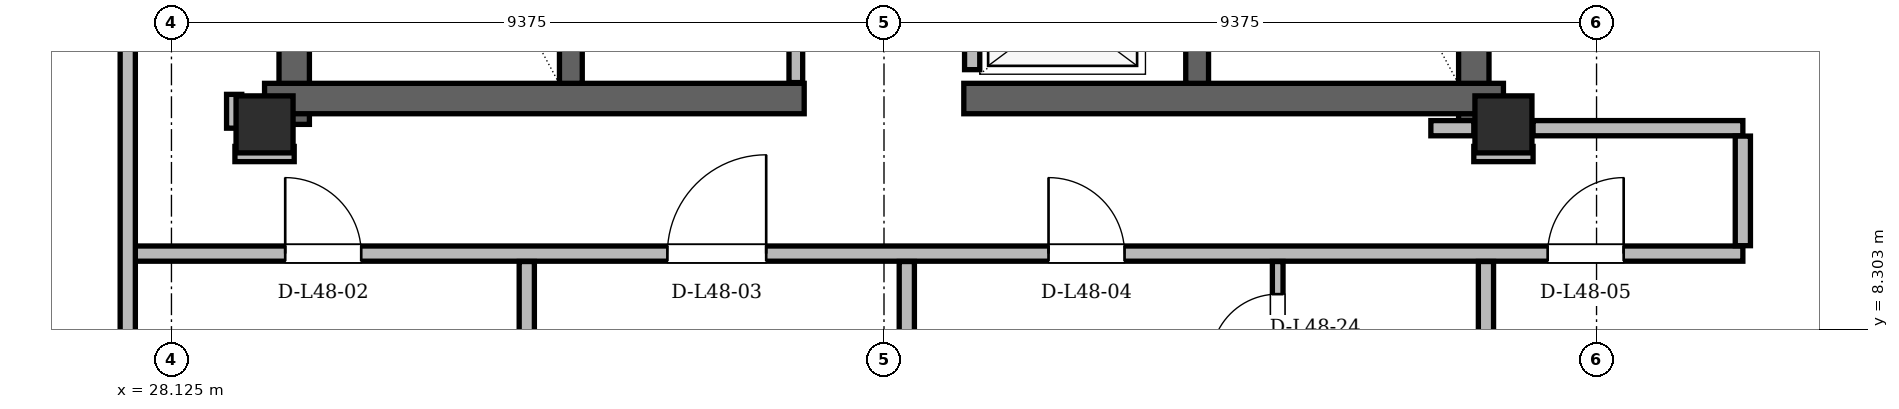
"""IFC4 building model, lengths in metres.
Left out: names, types, materials, properties, quantities, classifications, styles, units other than length and angle.
Written with IfcOpenShell. Run it as: python <this file> out.ifc"""

import sys

from ifc_helpers import new_model, si_unit, direction, frame, frame_2d, origin, origin_2d, place, context, subcontext, project, spatial, rectangle, hollow_rectangle, extrude, element, fill, save


model = new_model("IFC4")
c1 = context("Model", 3, precision=1e-05, world=origin(), true_north=direction((0.0, 1.0)))
c2 = subcontext(c1, "Body", "Model", "MODEL_VIEW")
j1 = project(units=[si_unit("LENGTHUNIT", "METRE"), si_unit("PLANEANGLEUNIT", "RADIAN")], contexts=[c1])
p1 = place(None, origin())
s1 = spatial("IfcSite", under=j1, at=p1, CompositionType="ELEMENT")
p2 = place(p1, origin())
s2 = spatial("IfcBuilding", under=s1, at=p2, CompositionType="ELEMENT")
p3 = place(p2, frame((0.0, 0.0, 181.8)))
s3 = spatial("IfcBuildingStorey", under=s2, at=p3, CompositionType="ELEMENT", Elevation=181.8)
for number, where, z_axis, x_axis in (
    (1, (29.35, 11.0, 0.0), (0.0, 0.0, 1.0), (1.0, 0.0, 0.0)),
    (2, (45.65, 11.0, 0.0), (0.0, 0.0, 1.0), (1.0, 0.0, 0.0)),
):
    element("IfcColumn", number, at=place(p3, frame(where, z_axis=z_axis, x_axis=x_axis)), inside=s3, PredefinedType="COLUMN", context=c2, shape_type="SweptSolid", body=[
        extrude(hollow_rectangle(XDim=0.75, YDim=0.75, WallThickness=0.06, at=origin_2d()), origin(), (0.0, 0.0, 1.0), 3.6),
    ])
for number, where, z_axis, x_axis in (
    (3, (29.74, 11.0, 0.0), (0.0, 0.0, 1.0), (0.0, 1.0, 0.0)),
    (4, (45.26, 11.0, 0.0), (0.0, 0.0, 1.0), (0.0, 1.0, 0.0)),
):
    element("IfcWall", number, at=place(p3, frame(where, z_axis=z_axis, x_axis=x_axis)), inside=s3, PredefinedType="SHEAR", context=c2, shape_type="SweptSolid", body=[
        extrude(rectangle(XDim=13.3, YDim=0.4, at=frame_2d((6.65, 0.0))), origin(), (0.0, 0.0, 1.0), 3.38),
    ])
for number, where, z_axis, x_axis in (
    (5, (29.35, 11.34, 0.0), (0.0, 0.0, 1.0), (1.0, 0.0, 0.0)),
    (6, (38.55, 11.34, 0.0), (0.0, 0.0, 1.0), (1.0, 0.0, 0.0)),
):
    element("IfcWall", number, at=place(p3, frame(where, z_axis=z_axis, x_axis=x_axis)), inside=s3, PredefinedType="SHEAR", context=c2, shape_type="SweptSolid", body=[
        extrude(rectangle(XDim=7.1, YDim=0.4, at=frame_2d((3.55, 0.0))), origin(), (0.0, 0.0, 1.0), 3.38),
    ])
for number, where, z_axis, x_axis in (
    (7, (33.38, 11.54, 0.0), (0.0, 0.0, 1.0), (0.0, 1.0, 0.0)),
    (8, (41.62, 11.54, 0.0), (0.0, 0.0, 1.0), (0.0, 1.0, 0.0)),
):
    element("IfcWall", number, at=place(p3, frame(where, z_axis=z_axis, x_axis=x_axis)), inside=s3, PredefinedType="SHEAR", context=c2, shape_type="SweptSolid", body=[
        extrude(rectangle(XDim=7.62, YDim=0.3, at=frame_2d((3.81, 0.0))), origin(), (0.0, 0.0, 1.0), 3.38),
    ])
p4 = place(p3, frame((36.34, 11.55, 0.0), z_axis=(0.0, 0.0, 1.0), x_axis=(0.0, 1.0, 0.0)))
e9 = element("IfcWall", 9, at=p4, inside=s3, PredefinedType="PARTITIONING", context=c2, shape_type="SweptSolid", body=[
    extrude(rectangle(XDim=5.55, YDim=0.18, at=frame_2d((2.775, 0.0))), origin(), (0.0, 0.0, 1.0), 3.38),
])
p5 = place(p4, frame((2.85, 0.0, 0.0)))
e10 = element("IfcOpeningElement", 10, at=p5, cuts=e9, PredefinedType="OPENING", context=c2, shape_type="SweptSolid", body=[
    extrude(rectangle(XDim=0.95, YDim=2.1, at=frame_2d((0.475, 1.05))), frame((0.0, 0.09, 0.0), z_axis=(0.0, -1.0, 0.0), x_axis=(1.0, 0.0, 0.0)), (0.0, 0.0, 1.0), 0.18),
])
p6 = place(p3, frame((38.66, 11.72, 0.0), z_axis=(0.0, 0.0, 1.0), x_axis=(0.0, 1.0, 0.0)))
e11 = element("IfcWall", 11, at=p6, inside=s3, PredefinedType="PARTITIONING", context=c2, shape_type="SweptSolid", body=[
    extrude(rectangle(XDim=9.1, YDim=0.2, at=frame_2d((4.55, 0.0))), origin(), (0.0, 0.0, 1.0), 3.38),
])
p7 = place(p6, frame((0.255, 0.0, 0.0)))
e12 = element("IfcOpeningElement", 12, at=p7, cuts=e11, PredefinedType="OPENING", context=c2, shape_type="SweptSolid", body=[
    extrude(rectangle(XDim=1.05, YDim=2.15, at=frame_2d((0.525, 1.075))), frame((0.0, 0.1, 0.0), z_axis=(0.0, -1.0, 0.0), x_axis=(1.0, 0.0, 0.0)), (0.0, 0.0, 1.0), 0.2),
])
p8 = place(p6, frame((2.105, 0.0, 0.0)))
e13 = element("IfcOpeningElement", 13, at=p8, cuts=e11, PredefinedType="OPENING", context=c2, shape_type="SweptSolid", body=[
    extrude(rectangle(XDim=1.05, YDim=2.15, at=frame_2d((0.525, 1.075))), frame((0.0, 0.1, 0.0), z_axis=(0.0, -1.0, 0.0), x_axis=(1.0, 0.0, 0.0)), (0.0, 0.0, 1.0), 0.2),
])
p9 = place(p6, frame((3.955, 0.0, 0.0)))
e14 = element("IfcOpeningElement", 14, at=p9, cuts=e11, PredefinedType="OPENING", context=c2, shape_type="SweptSolid", body=[
    extrude(rectangle(XDim=1.05, YDim=2.15, at=frame_2d((0.525, 1.075))), frame((0.0, 0.1, 0.0), z_axis=(0.0, -1.0, 0.0), x_axis=(1.0, 0.0, 0.0)), (0.0, 0.0, 1.0), 0.2),
])
p10 = place(p3, frame((27.55, 9.3, 0.0), z_axis=(0.0, 0.0, 1.0), x_axis=(1.0, 0.0, 0.0)))
e15 = element("IfcWall", 15, at=p10, inside=s3, PredefinedType="PARTITIONING", context=c2, shape_type="SweptSolid", body=[
    extrude(rectangle(XDim=21.25, YDim=0.2, at=frame_2d((10.625, 0.0))), origin(), (0.0, 0.0, 1.0), 2.842),
])
p11 = place(p10, frame((2.072, 0.0, 0.0)))
e16 = element("IfcOpeningElement", 16, at=p11, cuts=e15, PredefinedType="OPENING", context=c2, shape_type="SweptSolid", body=[
    extrude(rectangle(XDim=1.0, YDim=2.18, at=frame_2d((0.5, 1.09))), frame((0.0, 0.1, 0.0), z_axis=(0.0, -1.0, 0.0), x_axis=(1.0, 0.0, 0.0)), (0.0, 0.0, 1.0), 0.2),
])
p12 = place(p10, frame((7.1, 0.0, 0.0)))
e17 = element("IfcOpeningElement", 17, at=p12, cuts=e15, PredefinedType="OPENING", context=c2, shape_type="SweptSolid", body=[
    extrude(rectangle(XDim=1.3, YDim=2.2, at=frame_2d((0.65, 1.1))), frame((0.0, 0.1, 0.0), z_axis=(0.0, -1.0, 0.0), x_axis=(1.0, 0.0, 0.0)), (0.0, 0.0, 1.0), 0.2),
])
p13 = place(p10, frame((12.115, 0.0, 0.0)))
e18 = element("IfcOpeningElement", 18, at=p13, cuts=e15, PredefinedType="OPENING", context=c2, shape_type="SweptSolid", body=[
    extrude(rectangle(XDim=1.0, YDim=2.18, at=frame_2d((0.5, 1.09))), frame((0.0, 0.1, 0.0), z_axis=(0.0, -1.0, 0.0), x_axis=(1.0, 0.0, 0.0)), (0.0, 0.0, 1.0), 0.2),
])
p14 = place(p10, frame((18.682, 0.0, 0.0)))
e19 = element("IfcOpeningElement", 19, at=p14, cuts=e15, PredefinedType="OPENING", context=c2, shape_type="SweptSolid", body=[
    extrude(rectangle(XDim=1.0, YDim=2.18, at=frame_2d((0.5, 1.09))), frame((0.0, 0.1, 0.0), z_axis=(0.0, -1.0, 0.0), x_axis=(1.0, 0.0, 0.0)), (0.0, 0.0, 1.0), 0.2),
])
for number, where, z_axis, x_axis in (
    (20, (28.96, 10.61, 0.0), (0.0, 0.0, 1.0), (1.0, 0.0, 0.0)),
    (21, (45.26, 10.61, 0.0), (0.0, 0.0, 1.0), (1.0, 0.0, 0.0)),
):
    element("IfcWall", number, at=place(p3, frame(where, z_axis=z_axis, x_axis=x_axis)), inside=s3, PredefinedType="PARTITIONING", context=c2, shape_type="SweptSolid", body=[
        extrude(rectangle(XDim=0.78, YDim=0.2, at=frame_2d((0.39, 0.0))), origin(), (0.0, 0.0, 1.0), 3.38),
    ])
p15 = place(p3, frame((44.695, 10.95, 0.0), z_axis=(0.0, 0.0, 1.0), x_axis=(1.0, 0.0, 0.0)))
e22 = element("IfcWall", 22, at=p15, inside=s3, PredefinedType="PARTITIONING", context=c2, shape_type="SweptSolid", body=[
    extrude(rectangle(XDim=0.565, YDim=0.2, at=frame_2d((0.282, 0.0))), origin(), (0.0, 0.0, 1.0), 2.52),
])
p16 = place(p3, frame((46.04, 10.95, 0.0), z_axis=(0.0, 0.0, 1.0), x_axis=(1.0, 0.0, 0.0)))
e23 = element("IfcWall", 23, at=p16, inside=s3, PredefinedType="PARTITIONING", context=c2, shape_type="SweptSolid", body=[
    extrude(rectangle(XDim=2.76, YDim=0.2, at=frame_2d((1.38, 0.0))), origin(), (0.0, 0.0, 1.0), 2.842),
])
p17 = place(p3, frame((27.55, 5.178, 0.0), z_axis=(0.0, 0.0, 1.0), x_axis=(0.0, 1.0, 0.0)))
e24 = element("IfcWall", 24, at=p17, inside=s3, PredefinedType="PARTITIONING", context=c2, shape_type="SweptSolid", body=[
    extrude(rectangle(XDim=11.568, YDim=0.2, at=frame_2d((5.784, 0.0))), origin(), (0.0, 0.0, 1.0), 2.842),
])
p18 = place(p17, frame((8.148, 0.0, 0.0)))
e25 = element("IfcOpeningElement", 25, at=p18, cuts=e24, PredefinedType="OPENING", context=c2, shape_type="SweptSolid", body=[
    extrude(rectangle(XDim=1.0, YDim=2.18, at=frame_2d((0.5, 1.09))), frame((0.0, 0.1, 0.0), z_axis=(0.0, -1.0, 0.0), x_axis=(1.0, 0.0, 0.0)), (0.0, 0.0, 1.0), 0.2),
])
p19 = place(p3, frame((28.95, 10.95, 0.0), z_axis=(0.0, 0.0, 1.0), x_axis=(0.0, 1.0, 0.0)))
e26 = element("IfcWall", 26, at=p19, inside=s3, PredefinedType="PARTITIONING", context=c2, shape_type="SweptSolid", body=[
    extrude(rectangle(XDim=0.445, YDim=0.2, at=frame_2d((0.223, 0.0))), origin(), (0.0, 0.0, 1.0), 2.842),
])
p20 = place(p3, frame((32.8, 5.178, 0.0), z_axis=(0.0, 0.0, 1.0), x_axis=(0.0, 1.0, 0.0)))
e27 = element("IfcWall", 27, at=p20, inside=s3, PredefinedType="PARTITIONING", context=c2, shape_type="SweptSolid", body=[
    extrude(rectangle(XDim=4.018, YDim=0.2, at=frame_2d((2.009, 0.0))), origin(), (0.0, 0.0, 1.0), 2.966),
])
p21 = place(p3, frame((37.8, 5.178, 0.0), z_axis=(0.0, 0.0, 1.0), x_axis=(0.0, 1.0, 0.0)))
e28 = element("IfcWall", 28, at=p21, inside=s3, PredefinedType="PARTITIONING", context=c2, shape_type="SweptSolid", body=[
    extrude(rectangle(XDim=4.018, YDim=0.2, at=frame_2d((2.009, 0.0))), origin(), (0.0, 0.0, 1.0), 3.38),
])
p22 = place(p3, frame((42.68, 5.178, 0.0), z_axis=(0.0, 0.0, 1.0), x_axis=(0.0, 1.0, 0.0)))
e29 = element("IfcWall", 29, at=p22, inside=s3, PredefinedType="PARTITIONING", context=c2, shape_type="SweptSolid", body=[
    extrude(rectangle(XDim=4.018, YDim=0.14, at=frame_2d((2.009, 0.0))), origin(), (0.0, 0.0, 1.0), 2.966),
])
p23 = place(p22, frame((0.583, 0.0, 0.0)))
e30 = element("IfcOpeningElement", 30, at=p23, cuts=e29, PredefinedType="OPENING", context=c2, shape_type="SweptSolid", body=[
    extrude(rectangle(XDim=0.95, YDim=2.1, at=frame_2d((0.475, 1.05))), frame((0.0, 0.07, 0.0), z_axis=(0.0, -1.0, 0.0), x_axis=(1.0, 0.0, 0.0)), (0.0, 0.0, 1.0), 0.14),
])
p24 = place(p22, frame((2.709, 0.0, 0.0)))
e31 = element("IfcOpeningElement", 31, at=p24, cuts=e29, PredefinedType="OPENING", context=c2, shape_type="SweptSolid", body=[
    extrude(rectangle(XDim=0.88, YDim=2.08, at=frame_2d((0.44, 1.04))), frame((0.0, 0.07, 0.0), z_axis=(0.0, -1.0, 0.0), x_axis=(1.0, 0.0, 0.0)), (0.0, 0.0, 1.0), 0.14),
])
p25 = place(p3, frame((45.42, 5.178, 0.0), z_axis=(0.0, 0.0, 1.0), x_axis=(0.0, 1.0, 0.0)))
e32 = element("IfcWall", 32, at=p25, inside=s3, PredefinedType="PARTITIONING", context=c2, shape_type="SweptSolid", body=[
    extrude(rectangle(XDim=4.018, YDim=0.2, at=frame_2d((2.009, 0.0))), origin(), (0.0, 0.0, 1.0), 3.38),
])
p26 = place(p3, frame((48.8, 9.404, 0.0), z_axis=(0.0, 0.0, 1.0), x_axis=(0.0, 1.0, 0.0)))
e33 = element("IfcWall", 33, at=p26, inside=s3, PredefinedType="PARTITIONING", context=c2, shape_type="SweptSolid", body=[
    extrude(rectangle(XDim=1.442, YDim=0.2, at=frame_2d((0.721, 0.0))), origin(), (0.0, 0.0, 1.0), 3.38),
])
p27 = place(p11, origin())
e34 = element("IfcDoor", 34, at=p27, inside=s3, OperationType="SINGLE_SWING_LEFT", PredefinedType="DOOR", context=c2, shape_type="SweptSolid", body=[
    extrude(rectangle(XDim=1.0, YDim=2.18, at=frame_2d((0.5, 1.09))), frame((0.0, 0.025, 0.0), z_axis=(0.0, -1.0, 0.0), x_axis=(1.0, 0.0, 0.0)), (0.0, 0.0, 1.0), 0.05),
])
fill(e16, e34)
p28 = place(p12, origin())
e35 = element("IfcDoor", 35, at=p28, inside=s3, OperationType="SINGLE_SWING_RIGHT", PredefinedType="DOOR", context=c2, shape_type="SweptSolid", body=[
    extrude(rectangle(XDim=1.3, YDim=2.2, at=frame_2d((0.65, 1.1))), frame((0.0, 0.025, 0.0), z_axis=(0.0, -1.0, 0.0), x_axis=(1.0, 0.0, 0.0)), (0.0, 0.0, 1.0), 0.05),
])
fill(e17, e35)
p29 = place(p13, origin())
e36 = element("IfcDoor", 36, at=p29, inside=s3, OperationType="SINGLE_SWING_LEFT", PredefinedType="DOOR", context=c2, shape_type="SweptSolid", body=[
    extrude(rectangle(XDim=1.0, YDim=2.18, at=frame_2d((0.5, 1.09))), frame((0.0, 0.025, 0.0), z_axis=(0.0, -1.0, 0.0), x_axis=(1.0, 0.0, 0.0)), (0.0, 0.0, 1.0), 0.05),
])
fill(e18, e36)
p30 = place(p14, origin())
e37 = element("IfcDoor", 37, at=p30, inside=s3, OperationType="SINGLE_SWING_RIGHT", PredefinedType="DOOR", context=c2, shape_type="SweptSolid", body=[
    extrude(rectangle(XDim=1.0, YDim=2.18, at=frame_2d((0.5, 1.09))), frame((0.0, 0.025, 0.0), z_axis=(0.0, -1.0, 0.0), x_axis=(1.0, 0.0, 0.0)), (0.0, 0.0, 1.0), 0.05),
])
fill(e19, e37)
p31 = place(p24, origin())
e38 = element("IfcDoor", 38, at=p31, inside=s3, OperationType="SINGLE_SWING_LEFT", PredefinedType="DOOR", context=c2, shape_type="SweptSolid", body=[
    extrude(rectangle(XDim=0.88, YDim=2.08, at=frame_2d((0.44, 1.04))), frame((0.0, 0.025, 0.0), z_axis=(0.0, -1.0, 0.0), x_axis=(1.0, 0.0, 0.0)), (0.0, 0.0, 1.0), 0.05),
])
fill(e31, e38)
save(model, sys.argv[1])
